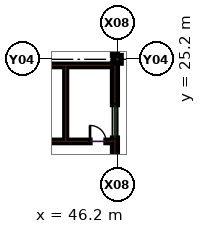
"""IFC4 building model, lengths in metres.
Left out: names, types, materials, properties, quantities, classifications, styles, units other than length and angle.
Written with IfcOpenShell. Run it as: python <this file> out.ifc"""

import sys

from ifc_helpers import new_model, si_unit, direction, frame, frame_2d, origin, origin_2d, place, context, subcontext, project, spatial, rectangle, extrude, element, fill, save


model = new_model("IFC4")
c1 = context("Model", 3, precision=1e-05, world=origin(), true_north=direction((0.0, 1.0)))
c2 = subcontext(c1, "Body", "Model", "MODEL_VIEW")
j1 = project(units=[si_unit("LENGTHUNIT", "METRE"), si_unit("PLANEANGLEUNIT", "RADIAN")], contexts=[c1])
p1 = place(None, origin())
s1 = spatial("IfcSite", under=j1, at=p1, CompositionType="ELEMENT")
p2 = place(p1, origin())
s2 = spatial("IfcBuilding", under=s1, at=p2, CompositionType="ELEMENT")
p3 = place(p2, frame((0.0, 0.0, 9.9)))
s3 = spatial("IfcBuildingStorey", under=s2, at=p3, CompositionType="ELEMENT", Elevation=9.9)
p4 = place(p3, frame((46.2, 25.2, 0.0), z_axis=(0.0, 0.0, 1.0), x_axis=(1.0, 0.0, 0.0)))
e1 = element("IfcColumn", 1, at=p4, inside=s3, PredefinedType="COLUMN", context=c2, shape_type="SweptSolid", body=[
    extrude(rectangle(XDim=0.5, YDim=0.5, at=origin_2d()), origin(), (0.0, 0.0, 1.0), 4.5),
])
p5 = place(p3, frame((33.3, 19.8, 0.0), z_axis=(0.0, 0.0, 1.0), x_axis=(1.0, 0.0, 0.0)))
e2 = element("IfcWall", 2, at=p5, inside=s3, PredefinedType="PARTITIONING", context=c2, shape_type="SweptSolid", body=[
    extrude(rectangle(XDim=12.65, YDim=0.16, at=frame_2d((6.325, 0.0))), origin(), (0.0, 0.0, 1.0), 3.49),
])
p6 = place(p5, frame((2.2, 0.0, 0.0)))
e3 = element("IfcOpeningElement", 3, at=p6, cuts=e2, PredefinedType="OPENING", context=c2, shape_type="SweptSolid", body=[
    extrude(rectangle(XDim=1.05, YDim=2.15, at=frame_2d((0.525, 1.075))), frame((0.0, 0.09, 0.0), z_axis=(0.0, -1.0, 0.0), x_axis=(1.0, 0.0, 0.0)), (0.0, 0.0, 1.0), 0.18),
])
p7 = place(p5, frame((7.0, 0.0, 0.0)))
e4 = element("IfcOpeningElement", 4, at=p7, cuts=e2, PredefinedType="OPENING", context=c2, shape_type="SweptSolid", body=[
    extrude(rectangle(XDim=1.05, YDim=2.15, at=frame_2d((0.525, 1.075))), frame((0.0, 0.09, 0.0), z_axis=(0.0, -1.0, 0.0), x_axis=(1.0, 0.0, 0.0)), (0.0, 0.0, 1.0), 0.18),
])
p8 = place(p5, frame((11.1, 0.0, 0.0)))
e5 = element("IfcOpeningElement", 5, at=p8, cuts=e2, PredefinedType="OPENING", context=c2, shape_type="SweptSolid", body=[
    extrude(rectangle(XDim=1.05, YDim=2.15, at=frame_2d((0.525, 1.075))), frame((0.0, 0.09, 0.0), z_axis=(0.0, -1.0, 0.0), x_axis=(1.0, 0.0, 0.0)), (0.0, 0.0, 1.0), 0.18),
])
p9 = place(p3, frame((40.05, 24.8, 0.0), z_axis=(0.0, 0.0, 1.0), x_axis=(1.0, 0.0, 0.0)))
e6 = element("IfcWall", 6, at=p9, inside=s3, PredefinedType="PARTITIONING", context=c2, shape_type="SweptSolid", body=[
    extrude(rectangle(XDim=5.9, YDim=0.16, at=frame_2d((2.95, 0.0))), origin(), (0.0, 0.0, 1.0), 3.49),
])
p10 = place(p3, frame((42.8, 19.8, 0.0), z_axis=(0.0, 0.0, 1.0), x_axis=(0.0, 1.0, 0.0)))
e7 = element("IfcWall", 7, at=p10, inside=s3, PredefinedType="PARTITIONING", context=c2, shape_type="SweptSolid", body=[
    extrude(rectangle(XDim=5.0, YDim=0.12, at=frame_2d((2.5, 0.0))), origin(), (0.0, 0.0, 1.0), 3.49),
])
p11 = place(p3, frame((46.04, 17.045, 0.0), z_axis=(0.0, 0.0, 1.0), x_axis=(0.0, 1.0, 0.0)))
e8 = element("IfcWall", 8, at=p11, inside=s3, PredefinedType="SOLIDWALL", context=c2, shape_type="SweptSolid", body=[
    extrude(rectangle(XDim=7.91, YDim=0.32, at=frame_2d((3.955, 0.0))), origin(), (0.0, 0.0, 1.0), 3.625),
])
p12 = place(p11, frame((2.975, 0.0, 0.95)))
e9 = element("IfcOpeningElement", 9, at=p12, cuts=e8, PredefinedType="OPENING", context=c2, shape_type="SweptSolid", body=[
    extrude(rectangle(XDim=2.2, YDim=1.85, at=frame_2d((1.1, 0.925))), frame((0.0, 0.17, 0.0), z_axis=(0.0, -1.0, 0.0), x_axis=(1.0, 0.0, 0.0)), (0.0, 0.0, 1.0), 0.34),
])
p13 = place(p3, frame((46.04, 25.445, 0.0), z_axis=(0.0, 0.0, 1.0), x_axis=(0.0, 1.0, 0.0)))
e10 = element("IfcWall", 10, at=p13, inside=s3, PredefinedType="SOLIDWALL", context=c2, shape_type="SweptSolid", body=[
    extrude(rectangle(XDim=7.91, YDim=0.32, at=frame_2d((3.955, 0.0))), origin(), (0.0, 0.0, 1.0), 3.625),
])
p14 = place(p13, frame((2.655, 0.0, 0.95)))
e11 = element("IfcOpeningElement", 11, at=p14, cuts=e10, PredefinedType="OPENING", context=c2, shape_type="SweptSolid", body=[
    extrude(rectangle(XDim=2.6, YDim=1.9, at=frame_2d((1.3, 0.95))), frame((0.0, 0.17, 0.0), z_axis=(0.0, -1.0, 0.0), x_axis=(1.0, 0.0, 0.0)), (0.0, 0.0, 1.0), 0.34),
])
p15 = place(p8, origin())
e12 = element("IfcDoor", 12, at=p15, inside=s3, OperationType="SINGLE_SWING_LEFT", PredefinedType="DOOR", context=c2, shape_type="SweptSolid", body=[
    extrude(rectangle(XDim=1.05, YDim=2.15, at=frame_2d((0.525, 1.075))), frame((0.0, 0.025, 0.0), z_axis=(0.0, -1.0, 0.0), x_axis=(1.0, 0.0, 0.0)), (0.0, 0.0, 1.0), 0.05),
])
fill(e5, e12)
p16 = place(p12, origin())
e13 = element("IfcWindow", 13, at=p16, inside=s3, PartitioningType="SINGLE_PANEL", PredefinedType="WINDOW", context=c2, shape_type="SweptSolid", body=[
    extrude(rectangle(XDim=2.2, YDim=1.85, at=frame_2d((1.1, 0.925))), frame((0.0, 0.03, 0.0), z_axis=(0.0, -1.0, 0.0), x_axis=(1.0, 0.0, 0.0)), (0.0, 0.0, 1.0), 0.06),
])
fill(e9, e13)
save(model, sys.argv[1])
